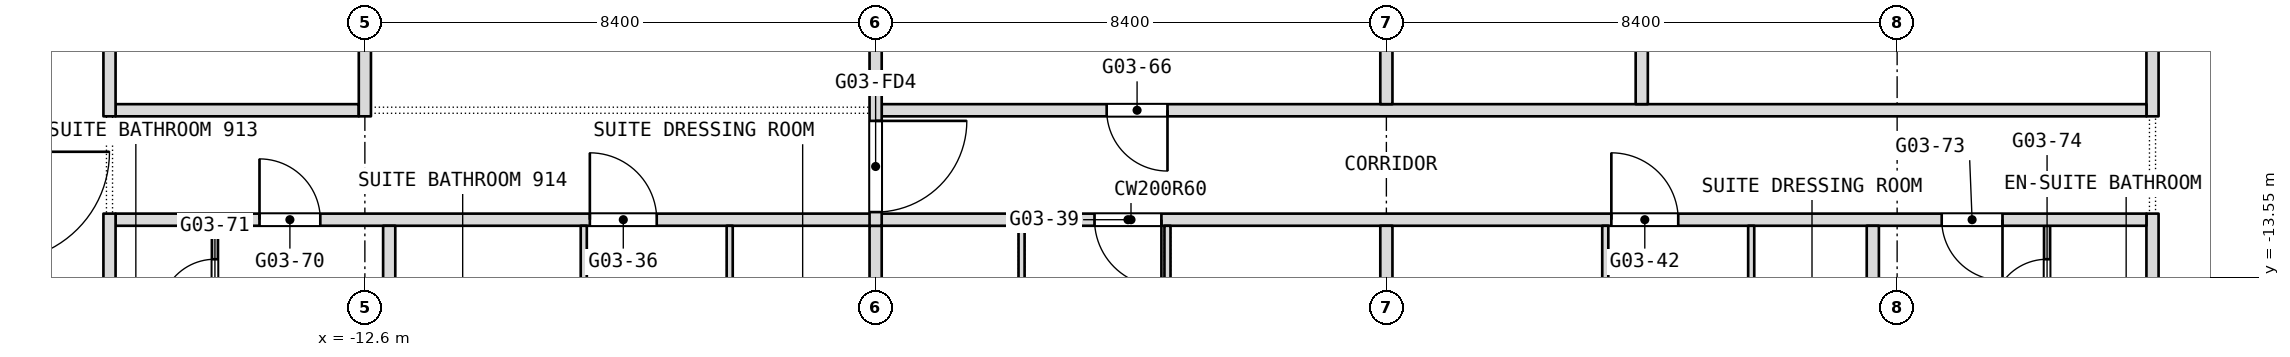
"""IFC4 building model, lengths in metres.
Left out: names, types, materials, properties, quantities, classifications, styles, units other than length and angle.
Written with IfcOpenShell. Run it as: python <this file> out.ifc"""

import sys

from ifc_helpers import new_model, si_unit, direction, frame, frame_2d, origin, place, context, subcontext, project, spatial, rectangle, extrude, element, fill, save


model = new_model("IFC4")
c1 = context("Model", 3, precision=1e-05, world=origin(), true_north=direction((0.0, 1.0)))
c2 = subcontext(c1, "Body", "Model", "MODEL_VIEW")
j1 = project(units=[si_unit("LENGTHUNIT", "METRE"), si_unit("PLANEANGLEUNIT", "RADIAN")], contexts=[c1])
p1 = place(None, origin())
s1 = spatial("IfcSite", under=j1, at=p1, CompositionType="ELEMENT")
p2 = place(p1, origin())
s2 = spatial("IfcBuilding", under=s1, at=p2, CompositionType="ELEMENT")
p3 = place(p2, frame((0.0, 0.0, 47.3)))
s3 = spatial("IfcBuildingStorey", under=s2, at=p3, CompositionType="ELEMENT", Elevation=47.3)
p4 = place(p3, frame((16.8, -17.143, 0.0), z_axis=(0.0, 0.0, 1.0), x_axis=(0.0, 1.0, 0.0)))
e1 = element("IfcWall", 1, at=p4, inside=s3, PredefinedType="PARTITIONING", context=c2, shape_type="SweptSolid", body=[
    extrude(rectangle(XDim=4.643, YDim=0.2, at=frame_2d((2.322, 0.0))), origin(), (0.0, 0.0, 1.0), 3.34),
])
p5 = place(p4, frame((0.771, 0.0, 0.0)))
e2 = element("IfcOpeningElement", 2, at=p5, cuts=e1, PredefinedType="OPENING", context=c2, shape_type="SweptSolid", body=[
    extrude(rectangle(XDim=0.9, YDim=2.1, at=frame_2d((0.45, 1.05))), frame((0.0, 0.1, 0.0), z_axis=(0.0, -1.0, 0.0), x_axis=(1.0, 0.0, 0.0)), (0.0, 0.0, 1.0), 0.2),
])
p6 = place(p3, frame((16.8, -10.9, 0.0), z_axis=(0.0, 0.0, 1.0), x_axis=(0.0, 1.0, 0.0)))
e3 = element("IfcWall", 3, at=p6, inside=s3, PredefinedType="PARTITIONING", context=c2, shape_type="SweptSolid", body=[
    extrude(rectangle(XDim=7.3, YDim=0.2, at=frame_2d((3.65, 0.0))), origin(), (0.0, 0.0, 1.0), 3.34),
])
p7 = place(p6, frame((3.15, 0.0, 0.0)))
e4 = element("IfcOpeningElement", 4, at=p7, cuts=e3, PredefinedType="OPENING", context=c2, shape_type="SweptSolid", body=[
    extrude(rectangle(XDim=1.0, YDim=2.1, at=frame_2d((0.5, 1.05))), frame((0.0, 0.1, 0.0), z_axis=(0.0, -1.0, 0.0), x_axis=(1.0, 0.0, 0.0)), (0.0, 0.0, 1.0), 0.2),
])
p8 = place(p3, frame((15.066, -14.9, 0.0), z_axis=(0.0, 0.0, 1.0), x_axis=(0.0, 1.0, 0.0)))
e5 = element("IfcWall", 5, at=p8, inside=s3, PredefinedType="PARTITIONING", context=c2, shape_type="SweptSolid", body=[
    extrude(rectangle(XDim=2.2, YDim=0.1, at=frame_2d((1.1, 0.0))), origin(), (0.0, 0.0, 1.0), 3.34),
])
p9 = place(p8, frame((0.75, 0.0, 0.0)))
e6 = element("IfcOpeningElement", 6, at=p9, cuts=e5, PredefinedType="OPENING", context=c2, shape_type="SweptSolid", body=[
    extrude(rectangle(XDim=0.9, YDim=2.1, at=frame_2d((0.45, 1.05))), frame((0.0, 0.05, 0.0), z_axis=(0.0, -1.0, 0.0), x_axis=(1.0, 0.0, 0.0)), (0.0, 0.0, 1.0), 0.1),
])
p10 = place(p3, frame((-16.7, -12.6, 0.0), z_axis=(0.0, 0.0, 1.0), x_axis=(1.0, 0.0, 0.0)))
e7 = element("IfcWall", 7, at=p10, inside=s3, PredefinedType="PARTITIONING", context=c2, shape_type="SweptSolid", body=[
    extrude(rectangle(XDim=33.4, YDim=0.2, at=frame_2d((16.7, 0.0))), origin(), (0.0, 0.0, 1.0), 3.34),
])
p11 = place(p10, frame((7.8, 0.0, 0.0)))
e8 = element("IfcOpeningElement", 8, at=p11, cuts=e7, PredefinedType="OPENING", context=c2, shape_type="SweptSolid", body=[
    extrude(rectangle(XDim=1.1, YDim=2.1, at=frame_2d((0.55, 1.05))), frame((0.0, 0.1, 0.0), z_axis=(0.0, -1.0, 0.0), x_axis=(1.0, 0.0, 0.0)), (0.0, 0.0, 1.0), 0.2),
])
p12 = place(p10, frame((16.1, 0.0, 0.0)))
e9 = element("IfcOpeningElement", 9, at=p12, cuts=e7, PredefinedType="OPENING", context=c2, shape_type="SweptSolid", body=[
    extrude(rectangle(XDim=1.1, YDim=2.1, at=frame_2d((0.55, 1.05))), frame((0.0, 0.1, 0.0), z_axis=(0.0, -1.0, 0.0), x_axis=(1.0, 0.0, 0.0)), (0.0, 0.0, 1.0), 0.2),
])
p13 = place(p10, frame((24.6, 0.0, 0.0)))
e10 = element("IfcOpeningElement", 10, at=p13, cuts=e7, PredefinedType="OPENING", context=c2, shape_type="SweptSolid", body=[
    extrude(rectangle(XDim=1.1, YDim=2.1, at=frame_2d((0.55, 1.05))), frame((0.0, 0.1, 0.0), z_axis=(0.0, -1.0, 0.0), x_axis=(1.0, 0.0, 0.0)), (0.0, 0.0, 1.0), 0.2),
])
p14 = place(p10, frame((2.367, 0.0, 0.0)))
e11 = element("IfcOpeningElement", 11, at=p14, cuts=e7, PredefinedType="OPENING", context=c2, shape_type="SweptSolid", body=[
    extrude(rectangle(XDim=1.0, YDim=2.1, at=frame_2d((0.5, 1.05))), frame((0.0, 0.1, 0.0), z_axis=(0.0, -1.0, 0.0), x_axis=(1.0, 0.0, 0.0)), (0.0, 0.0, 1.0), 0.2),
])
p15 = place(p10, frame((30.033, 0.0, 0.0)))
e12 = element("IfcOpeningElement", 12, at=p15, cuts=e7, PredefinedType="OPENING", context=c2, shape_type="SweptSolid", body=[
    extrude(rectangle(XDim=1.0, YDim=2.1, at=frame_2d((0.5, 1.05))), frame((0.0, 0.1, 0.0), z_axis=(0.0, -1.0, 0.0), x_axis=(1.0, 0.0, 0.0)), (0.0, 0.0, 1.0), 0.2),
])
p16 = place(p3, frame((12.2, -15.8, 0.0), z_axis=(0.0, 0.0, 1.0), x_axis=(0.0, 1.0, 0.0)))
e13 = element("IfcWall", 13, at=p16, inside=s3, PredefinedType="PARTITIONING", context=c2, shape_type="SweptSolid", body=[
    extrude(rectangle(XDim=3.1, YDim=0.2, at=frame_2d((1.55, 0.0))), origin(), (0.0, 0.0, 1.0), 3.34),
])
p17 = place(p3, frame((-16.7, -10.8, 0.0), z_axis=(0.0, 0.0, 1.0), x_axis=(1.0, 0.0, 0.0)))
e14 = element("IfcWall", 14, at=p17, inside=s3, PredefinedType="PARTITIONING", context=c2, shape_type="SweptSolid", body=[
    extrude(rectangle(XDim=4.0, YDim=0.2, at=frame_2d((2.0, 0.0))), origin(), (0.0, 0.0, 1.0), 3.34),
])
p18 = place(p3, frame((-4.1, -10.8, 0.0), z_axis=(0.0, 0.0, 1.0), x_axis=(1.0, 0.0, 0.0)))
e15 = element("IfcWall", 15, at=p18, inside=s3, PredefinedType="PARTITIONING", context=c2, shape_type="SweptSolid", body=[
    extrude(rectangle(XDim=20.8, YDim=0.2, at=frame_2d((10.4, 0.0))), origin(), (0.0, 0.0, 1.0), 3.34),
])
p19 = place(p18, frame((3.7, 0.0, 0.0)))
e16 = element("IfcOpeningElement", 16, at=p19, cuts=e15, PredefinedType="OPENING", context=c2, shape_type="SweptSolid", body=[
    extrude(rectangle(XDim=1.0, YDim=2.1, at=frame_2d((0.5, 1.05))), frame((0.0, 0.1, 0.0), z_axis=(0.0, -1.0, 0.0), x_axis=(1.0, 0.0, 0.0)), (0.0, 0.0, 1.0), 0.2),
])
p20 = place(p3, frame((10.2, -16.25, 0.0), z_axis=(0.0, 0.0, 1.0), x_axis=(0.0, 1.0, 0.0)))
e17 = element("IfcWall", 17, at=p20, inside=s3, PredefinedType="PARTITIONING", context=c2, shape_type="SweptSolid", body=[
    extrude(rectangle(XDim=3.55, YDim=0.1, at=frame_2d((1.775, 0.0))), origin(), (0.0, 0.0, 1.0), 3.34),
])
p21 = place(p3, frame((8.4, -10.7, 0.0), z_axis=(0.0, 0.0, 1.0), x_axis=(0.0, 1.0, 0.0)))
e18 = element("IfcWall", 18, at=p21, inside=s3, PredefinedType="PARTITIONING", context=c2, shape_type="SweptSolid", body=[
    extrude(rectangle(XDim=3.6, YDim=0.2, at=frame_2d((1.8, 0.0))), origin(), (0.0, 0.0, 1.0), 3.34),
])
p22 = place(p3, frame((7.8, -16.15, 0.0), z_axis=(0.0, 0.0, 1.0), x_axis=(0.0, 1.0, 0.0)))
e19 = element("IfcWall", 19, at=p22, inside=s3, PredefinedType="PARTITIONING", context=c2, shape_type="SweptSolid", body=[
    extrude(rectangle(XDim=3.45, YDim=0.1, at=frame_2d((1.725, 0.0))), origin(), (0.0, 0.0, 1.0), 3.34),
])
p23 = place(p3, frame((4.2, -17.7, 0.0), z_axis=(0.0, 0.0, 1.0), x_axis=(0.0, 1.0, 0.0)))
e20 = element("IfcWall", 20, at=p23, inside=s3, PredefinedType="PARTITIONING", context=c2, shape_type="SweptSolid", body=[
    extrude(rectangle(XDim=5.0, YDim=0.2, at=frame_2d((2.5, 0.0))), origin(), (0.0, 0.0, 1.0), 3.34),
])
p24 = place(p3, frame((4.2, -10.7, 0.0), z_axis=(0.0, 0.0, 1.0), x_axis=(0.0, 1.0, 0.0)))
e21 = element("IfcWall", 21, at=p24, inside=s3, PredefinedType="PARTITIONING", context=c2, shape_type="SweptSolid", body=[
    extrude(rectangle(XDim=8.8, YDim=0.2, at=frame_2d((4.4, 0.0))), origin(), (0.0, 0.0, 1.0), 3.34),
])
p25 = place(p3, frame((0.6, -16.25, 0.0), z_axis=(0.0, 0.0, 1.0), x_axis=(0.0, 1.0, 0.0)))
e22 = element("IfcWall", 22, at=p25, inside=s3, PredefinedType="PARTITIONING", context=c2, shape_type="SweptSolid", body=[
    extrude(rectangle(XDim=3.55, YDim=0.1, at=frame_2d((1.775, 0.0))), origin(), (0.0, 0.0, 1.0), 3.34),
])
p26 = place(p3, frame((-1.8, -16.15, 0.0), z_axis=(0.0, 0.0, 1.0), x_axis=(0.0, 1.0, 0.0)))
e23 = element("IfcWall", 23, at=p26, inside=s3, PredefinedType="PARTITIONING", context=c2, shape_type="SweptSolid", body=[
    extrude(rectangle(XDim=3.45, YDim=0.1, at=frame_2d((1.725, 0.0))), origin(), (0.0, 0.0, 1.0), 3.34),
])
p27 = place(p3, frame((-4.2, -17.7, 0.0), z_axis=(0.0, 0.0, 1.0), x_axis=(0.0, 1.0, 0.0)))
e24 = element("IfcWall", 24, at=p27, inside=s3, PredefinedType="PARTITIONING", context=c2, shape_type="SweptSolid", body=[
    extrude(rectangle(XDim=5.0, YDim=0.2, at=frame_2d((2.5, 0.0))), origin(), (0.0, 0.0, 1.0), 3.34),
])
p28 = place(p3, frame((-4.2, -12.7, 0.0), z_axis=(0.0, 0.0, 1.0), x_axis=(0.0, 1.0, 0.0)))
e25 = element("IfcWall", 25, at=p28, inside=s3, PredefinedType="PARTITIONING", context=c2, shape_type="SweptSolid", body=[
    extrude(rectangle(XDim=12.7, YDim=0.2, at=frame_2d((6.35, 0.0))), origin(), (0.0, 0.0, 1.0), 3.34),
])
p29 = place(p28, frame((11.05, 0.0, 0.0)))
e26 = element("IfcOpeningElement", 26, at=p29, cuts=e25, PredefinedType="OPENING", context=c2, shape_type="SweptSolid", body=[
    extrude(rectangle(XDim=1.5, YDim=2.1, at=frame_2d((0.75, 1.05))), frame((0.0, 0.1, 0.0), z_axis=(0.0, -1.0, 0.0), x_axis=(1.0, 0.0, 0.0)), (0.0, 0.0, 1.0), 0.2),
])
p30 = place(p28, frame((0.225, 0.0, 0.0)))
e27 = element("IfcOpeningElement", 27, at=p30, cuts=e25, PredefinedType="OPENING", context=c2, shape_type="SweptSolid", body=[
    extrude(rectangle(XDim=1.5, YDim=2.1, at=frame_2d((0.75, 1.05))), frame((0.0, 0.1, 0.0), z_axis=(0.0, -1.0, 0.0), x_axis=(1.0, 0.0, 0.0)), (0.0, 0.0, 1.0), 0.2),
])
p31 = place(p3, frame((-6.6, -16.25, 0.0), z_axis=(0.0, 0.0, 1.0), x_axis=(0.0, 1.0, 0.0)))
e28 = element("IfcWall", 28, at=p31, inside=s3, PredefinedType="PARTITIONING", context=c2, shape_type="SweptSolid", body=[
    extrude(rectangle(XDim=3.55, YDim=0.1, at=frame_2d((1.775, 0.0))), origin(), (0.0, 0.0, 1.0), 3.34),
])
p32 = place(p3, frame((-9.0, -16.15, 0.0), z_axis=(0.0, 0.0, 1.0), x_axis=(0.0, 1.0, 0.0)))
e29 = element("IfcWall", 29, at=p32, inside=s3, PredefinedType="PARTITIONING", context=c2, shape_type="SweptSolid", body=[
    extrude(rectangle(XDim=3.45, YDim=0.1, at=frame_2d((1.725, 0.0))), origin(), (0.0, 0.0, 1.0), 3.34),
])
p33 = place(p32, frame((0.94, 0.0, 0.0)))
e30 = element("IfcOpeningElement", 30, at=p33, cuts=e29, PredefinedType="OPENING", context=c2, shape_type="SweptSolid", body=[
    extrude(rectangle(XDim=0.9, YDim=2.1, at=frame_2d((0.45, 1.05))), frame((0.0, 0.05, 0.0), z_axis=(0.0, -1.0, 0.0), x_axis=(1.0, 0.0, 0.0)), (0.0, 0.0, 1.0), 0.1),
])
p34 = place(p3, frame((-12.2, -16.0, 0.0), z_axis=(0.0, 0.0, 1.0), x_axis=(0.0, 1.0, 0.0)))
e31 = element("IfcWall", 31, at=p34, inside=s3, PredefinedType="PARTITIONING", context=c2, shape_type="SweptSolid", body=[
    extrude(rectangle(XDim=3.3, YDim=0.2, at=frame_2d((1.65, 0.0))), origin(), (0.0, 0.0, 1.0), 3.34),
])
p35 = place(p3, frame((-12.6, -10.9, 0.0), z_axis=(0.0, 0.0, 1.0), x_axis=(0.0, 1.0, 0.0)))
e32 = element("IfcWall", 32, at=p35, inside=s3, PredefinedType="PARTITIONING", context=c2, shape_type="SweptSolid", body=[
    extrude(rectangle(XDim=5.6, YDim=0.2, at=frame_2d((2.8, 0.0))), origin(), (0.0, 0.0, 1.0), 3.34),
])
p36 = place(p3, frame((-15.066, -14.9, 0.0), z_axis=(0.0, 0.0, 1.0), x_axis=(0.0, 1.0, 0.0)))
e33 = element("IfcWall", 33, at=p36, inside=s3, PredefinedType="PARTITIONING", context=c2, shape_type="SweptSolid", body=[
    extrude(rectangle(XDim=2.2, YDim=0.1, at=frame_2d((1.1, 0.0))), origin(), (0.0, 0.0, 1.0), 3.34),
])
p37 = place(p36, frame((0.75, 0.0, 0.0)))
e34 = element("IfcOpeningElement", 34, at=p37, cuts=e33, PredefinedType="OPENING", context=c2, shape_type="SweptSolid", body=[
    extrude(rectangle(XDim=0.9, YDim=2.1, at=frame_2d((0.45, 1.05))), frame((0.0, 0.05, 0.0), z_axis=(0.0, -1.0, 0.0), x_axis=(1.0, 0.0, 0.0)), (0.0, 0.0, 1.0), 0.1),
])
p38 = place(p3, frame((-16.8, -17.143, 0.0), z_axis=(0.0, 0.0, 1.0), x_axis=(0.0, 1.0, 0.0)))
e35 = element("IfcWall", 35, at=p38, inside=s3, PredefinedType="PARTITIONING", context=c2, shape_type="SweptSolid", body=[
    extrude(rectangle(XDim=4.643, YDim=0.2, at=frame_2d((2.322, 0.0))), origin(), (0.0, 0.0, 1.0), 3.34),
])
p39 = place(p38, frame((0.772, 0.0, 0.0)))
e36 = element("IfcOpeningElement", 36, at=p39, cuts=e35, PredefinedType="OPENING", context=c2, shape_type="SweptSolid", body=[
    extrude(rectangle(XDim=0.9, YDim=2.1, at=frame_2d((0.45, 1.05))), frame((0.0, 0.1, 0.0), z_axis=(0.0, -1.0, 0.0), x_axis=(1.0, 0.0, 0.0)), (0.0, 0.0, 1.0), 0.2),
])
p40 = place(p3, frame((-16.8, -10.9, 0.0), z_axis=(0.0, 0.0, 1.0), x_axis=(0.0, 1.0, 0.0)))
e37 = element("IfcWall", 37, at=p40, inside=s3, PredefinedType="PARTITIONING", context=c2, shape_type="SweptSolid", body=[
    extrude(rectangle(XDim=9.0, YDim=0.2, at=frame_2d((4.5, 0.0))), origin(), (0.0, 0.0, 1.0), 3.34),
])
p41 = place(p9, origin())
e38 = element("IfcDoor", 38, at=p41, inside=s3, OperationType="SINGLE_SWING_RIGHT", PredefinedType="DOOR", context=c2, shape_type="SweptSolid", body=[
    extrude(rectangle(XDim=0.9, YDim=2.1, at=frame_2d((0.45, 1.05))), frame((0.0, 0.025, 0.0), z_axis=(0.0, -1.0, 0.0), x_axis=(1.0, 0.0, 0.0)), (0.0, 0.0, 1.0), 0.05),
])
fill(e6, e38)
p42 = place(p11, origin())
e39 = element("IfcDoor", 39, at=p42, inside=s3, OperationType="SINGLE_SWING_RIGHT", PredefinedType="DOOR", context=c2, shape_type="SweptSolid", body=[
    extrude(rectangle(XDim=1.1, YDim=2.1, at=frame_2d((0.55, 1.05))), frame((0.0, 0.025, 0.0), z_axis=(0.0, -1.0, 0.0), x_axis=(1.0, 0.0, 0.0)), (0.0, 0.0, 1.0), 0.05),
])
fill(e8, e39)
p43 = place(p12, origin())
e40 = element("IfcDoor", 40, at=p43, inside=s3, OperationType="SINGLE_SWING_LEFT", PredefinedType="DOOR", context=c2, shape_type="SweptSolid", body=[
    extrude(rectangle(XDim=1.1, YDim=2.1, at=frame_2d((0.55, 1.05))), frame((0.0, 0.025, 0.0), z_axis=(0.0, -1.0, 0.0), x_axis=(1.0, 0.0, 0.0)), (0.0, 0.0, 1.0), 0.05),
])
fill(e9, e40)
p44 = place(p13, origin())
e41 = element("IfcDoor", 41, at=p44, inside=s3, OperationType="SINGLE_SWING_RIGHT", PredefinedType="DOOR", context=c2, shape_type="SweptSolid", body=[
    extrude(rectangle(XDim=1.1, YDim=2.1, at=frame_2d((0.55, 1.05))), frame((0.0, 0.025, 0.0), z_axis=(0.0, -1.0, 0.0), x_axis=(1.0, 0.0, 0.0)), (0.0, 0.0, 1.0), 0.05),
])
fill(e10, e41)
p45 = place(p14, origin())
e42 = element("IfcDoor", 42, at=p45, inside=s3, OperationType="SINGLE_SWING_RIGHT", PredefinedType="DOOR", context=c2, shape_type="SweptSolid", body=[
    extrude(rectangle(XDim=1.0, YDim=2.1, at=frame_2d((0.5, 1.05))), frame((0.0, 0.025, 0.0), z_axis=(0.0, -1.0, 0.0), x_axis=(1.0, 0.0, 0.0)), (0.0, 0.0, 1.0), 0.05),
])
fill(e11, e42)
p46 = place(p15, origin())
e43 = element("IfcDoor", 43, at=p46, inside=s3, OperationType="SINGLE_SWING_LEFT", PredefinedType="DOOR", context=c2, shape_type="SweptSolid", body=[
    extrude(rectangle(XDim=1.0, YDim=2.1, at=frame_2d((0.5, 1.05))), frame((0.0, 0.025, 0.0), z_axis=(0.0, -1.0, 0.0), x_axis=(1.0, 0.0, 0.0)), (0.0, 0.0, 1.0), 0.05),
])
fill(e12, e43)
p47 = place(p19, origin())
e44 = element("IfcDoor", 44, at=p47, inside=s3, OperationType="SINGLE_SWING_RIGHT", PredefinedType="DOOR", context=c2, shape_type="SweptSolid", body=[
    extrude(rectangle(XDim=1.0, YDim=2.1, at=frame_2d((0.5, 1.05))), frame((0.0, 0.025, 0.0), z_axis=(0.0, -1.0, 0.0), x_axis=(1.0, 0.0, 0.0)), (0.0, 0.0, 1.0), 0.05),
])
fill(e16, e44)
p48 = place(p37, origin())
e45 = element("IfcDoor", 45, at=p48, inside=s3, OperationType="SINGLE_SWING_RIGHT", PredefinedType="DOOR", context=c2, shape_type="SweptSolid", body=[
    extrude(rectangle(XDim=0.9, YDim=2.1, at=frame_2d((0.45, 1.05))), frame((0.0, 0.025, 0.0), z_axis=(0.0, -1.0, 0.0), x_axis=(1.0, 0.0, 0.0)), (0.0, 0.0, 1.0), 0.05),
])
fill(e34, e45)
p49 = place(p30, origin())
e46 = element("IfcDoor", 46, at=p49, inside=s3, OperationType="DOUBLE_DOOR_DOUBLE_SWING", PredefinedType="DOOR", context=c2, shape_type="SweptSolid", body=[
    extrude(rectangle(XDim=1.5, YDim=2.1, at=frame_2d((0.75, 1.05))), frame((0.0, 0.025, 0.0), z_axis=(0.0, -1.0, 0.0), x_axis=(1.0, 0.0, 0.0)), (0.0, 0.0, 1.0), 0.05),
])
fill(e27, e46)
save(model, sys.argv[1])
